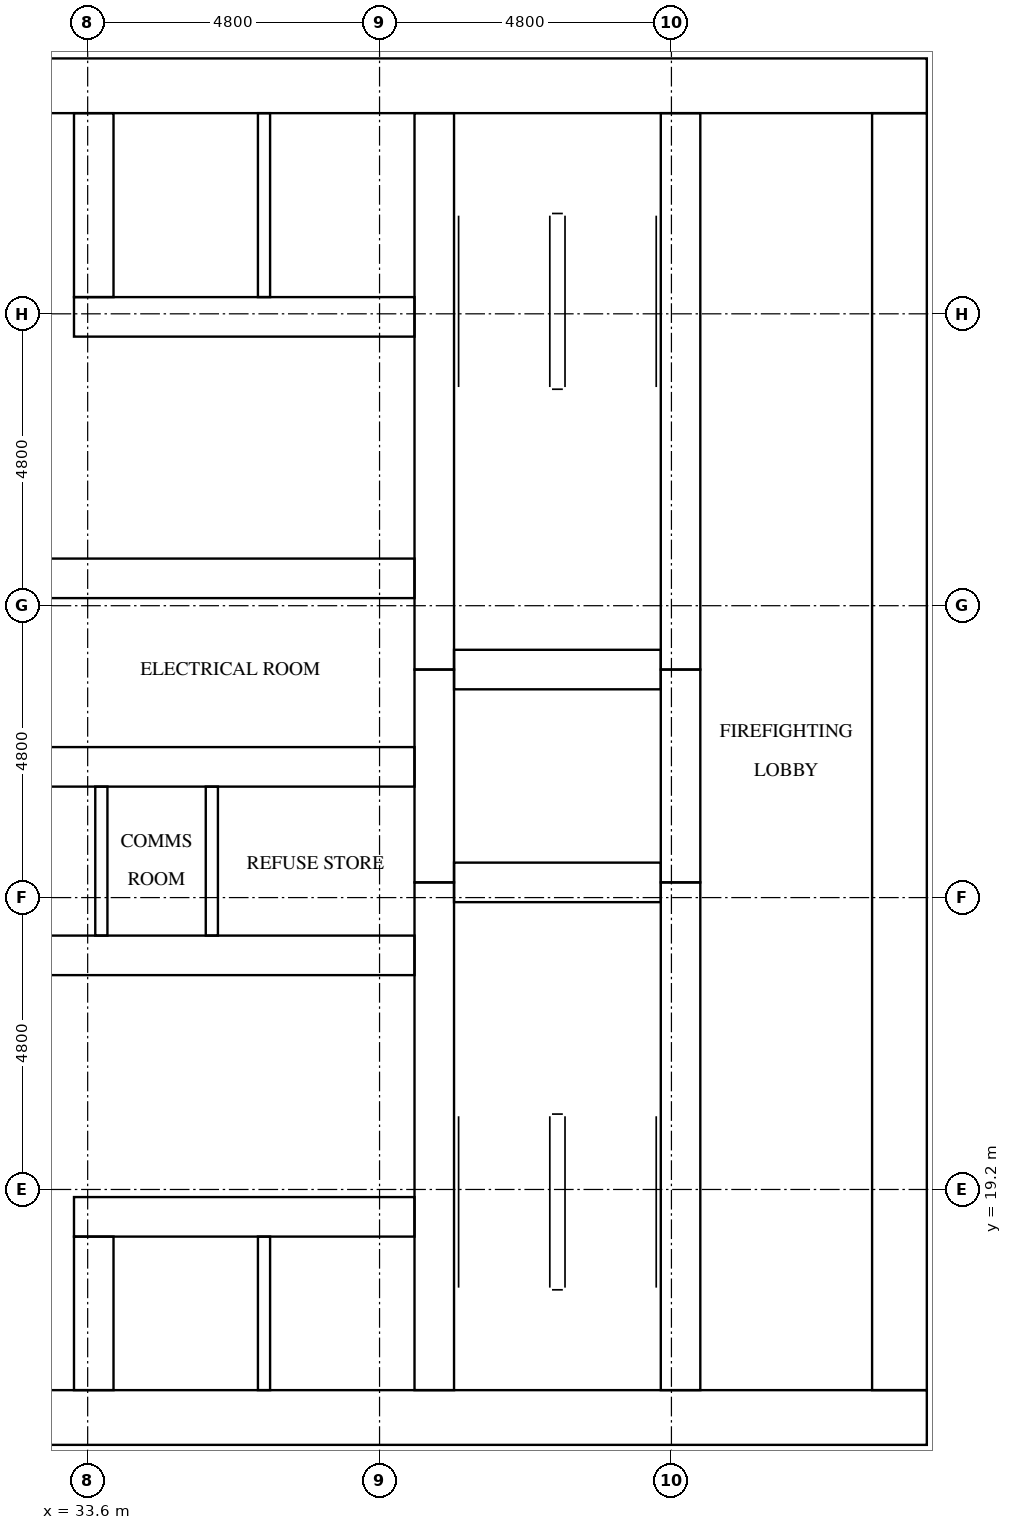
"""IFC4 building model, lengths in metres.
Left out: names, types, materials, properties, quantities, classifications, styles, units other than length and angle.
Written with IfcOpenShell. Run it as: python <this file> out.ifc"""

import sys

from ifc_helpers import new_model, si_unit, direction, frame, frame_2d, origin, place, context, subcontext, project, spatial, rectangle, extrude, element, fill, save


model = new_model("IFC4")
c1 = context("Model", 3, precision=1e-05, world=origin(), true_north=direction((0.0, 1.0)))
c2 = subcontext(c1, "Body", "Model", "MODEL_VIEW")
j1 = project(units=[si_unit("LENGTHUNIT", "METRE"), si_unit("PLANEANGLEUNIT", "RADIAN")], contexts=[c1])
p1 = place(None, origin())
s1 = spatial("IfcSite", under=j1, at=p1, CompositionType="ELEMENT")
p2 = place(p1, origin())
s2 = spatial("IfcBuilding", under=s1, at=p2, CompositionType="ELEMENT")
p3 = place(p2, frame((0.0, 0.0, 66.3)))
s3 = spatial("IfcBuildingStorey", under=s2, at=p3, CompositionType="ELEMENT", Elevation=66.3)
p4 = place(p3, frame((15.0, 15.45, 0.0), z_axis=(0.0, 0.0, 1.0), x_axis=(1.0, 0.0, 0.0)))
e1 = element("IfcWall", 1, at=p4, inside=s3, PredefinedType="SHEAR", context=c2, shape_type="SweptSolid", body=[
    extrude(rectangle(XDim=32.4, YDim=0.9, at=frame_2d((16.2, 0.0))), origin(), (0.0, 0.0, 1.0), 3.2),
])
p5 = place(p4, frame((15.3, 0.0, 0.0)))
e2 = element("IfcOpeningElement", 2, at=p5, cuts=e1, PredefinedType="OPENING", context=c2, shape_type="SweptSolid", body=[
    extrude(rectangle(XDim=1.8, YDim=2.1, at=frame_2d((0.9, 1.05))), frame((0.0, 0.46, 0.0), z_axis=(0.0, -1.0, 0.0), x_axis=(1.0, 0.0, 0.0)), (0.0, 0.0, 1.0), 0.92),
])
p6 = place(p3, frame((15.0, 37.35, 0.0), z_axis=(0.0, 0.0, 1.0), x_axis=(1.0, 0.0, 0.0)))
e3 = element("IfcWall", 3, at=p6, inside=s3, PredefinedType="SHEAR", context=c2, shape_type="SweptSolid", body=[
    extrude(rectangle(XDim=32.4, YDim=0.9, at=frame_2d((16.2, 0.0))), origin(), (0.0, 0.0, 1.0), 3.2),
])
p7 = place(p6, frame((15.3, 0.0, 0.0)))
e4 = element("IfcOpeningElement", 4, at=p7, cuts=e3, PredefinedType="OPENING", context=c2, shape_type="SweptSolid", body=[
    extrude(rectangle(XDim=1.8, YDim=2.1, at=frame_2d((0.9, 1.05))), frame((0.0, 0.46, 0.0), z_axis=(0.0, -1.0, 0.0), x_axis=(1.0, 0.0, 0.0)), (0.0, 0.0, 1.0), 0.92),
])
p8 = place(p6, frame((1.794, 0.0, 0.0)))
e5 = element("IfcOpeningElement", 5, at=p8, cuts=e3, PredefinedType="OPENING", context=c2, shape_type="SweptSolid", body=[
    extrude(rectangle(XDim=1.0, YDim=2.1, at=frame_2d((0.5, 1.05))), frame((0.0, 0.46, 0.0), z_axis=(0.0, -1.0, 0.0), x_axis=(1.0, 0.0, 0.0)), (0.0, 0.0, 1.0), 0.92),
])
p9 = place(p6, frame((5.331, 0.0, 0.0)))
e6 = element("IfcOpeningElement", 6, at=p9, cuts=e3, PredefinedType="OPENING", context=c2, shape_type="SweptSolid", body=[
    extrude(rectangle(XDim=1.0, YDim=2.1, at=frame_2d((0.5, 1.05))), frame((0.0, 0.46, 0.0), z_axis=(0.0, -1.0, 0.0), x_axis=(1.0, 0.0, 0.0)), (0.0, 0.0, 1.0), 0.92),
])
p10 = place(p3, frame((46.95, 15.9, 0.0), z_axis=(0.0, 0.0, 1.0), x_axis=(0.0, 1.0, 0.0)))
e7 = element("IfcWall", 7, at=p10, inside=s3, PredefinedType="SHEAR", context=c2, shape_type="SweptSolid", body=[
    extrude(rectangle(XDim=21.0, YDim=0.9, at=frame_2d((10.5, 0.0))), origin(), (0.0, 0.0, 1.0), 3.2),
])
p11 = place(p10, frame((10.2, 0.0, 0.0)))
e8 = element("IfcOpeningElement", 8, at=p11, cuts=e7, PredefinedType="OPENING", context=c2, shape_type="SweptSolid", body=[
    extrude(rectangle(XDim=1.2, YDim=2.1, at=frame_2d((0.6, 1.05))), frame((0.0, 0.46, 0.0), z_axis=(0.0, -1.0, 0.0), x_axis=(1.0, 0.0, 0.0)), (0.0, 0.0, 1.0), 0.92),
])
p12 = place(p3, frame((39.3, 15.9, 0.0), z_axis=(0.0, 0.0, 1.0), x_axis=(0.0, 1.0, 0.0)))
e9 = element("IfcWall", 9, at=p12, inside=s3, PredefinedType="SHEAR", context=c2, shape_type="SweptSolid", body=[
    extrude(rectangle(XDim=8.35, YDim=0.65, at=frame_2d((4.175, 0.0))), origin(), (0.0, 0.0, 1.0), 3.2),
])
p13 = place(p3, frame((39.3, 24.25, 0.0), z_axis=(0.0, 0.0, 1.0), x_axis=(0.0, 1.0, 0.0)))
e10 = element("IfcWall", 10, at=p13, inside=s3, PredefinedType="SHEAR", context=c2, shape_type="SweptSolid", body=[
    extrude(rectangle(XDim=3.5, YDim=0.65, at=frame_2d((1.75, 0.0))), origin(), (0.0, 0.0, 1.0), 3.2),
])
p14 = place(p3, frame((39.3, 27.75, 0.0), z_axis=(0.0, 0.0, 1.0), x_axis=(0.0, 1.0, 0.0)))
e11 = element("IfcWall", 11, at=p14, inside=s3, PredefinedType="SHEAR", context=c2, shape_type="SweptSolid", body=[
    extrude(rectangle(XDim=9.15, YDim=0.65, at=frame_2d((4.575, 0.0))), origin(), (0.0, 0.0, 1.0), 3.2),
])
p15 = place(p3, frame((43.35, 15.9, 0.0), z_axis=(0.0, 0.0, 1.0), x_axis=(0.0, 1.0, 0.0)))
e12 = element("IfcWall", 12, at=p15, inside=s3, PredefinedType="SHEAR", context=c2, shape_type="SweptSolid", body=[
    extrude(rectangle(XDim=8.35, YDim=0.65, at=frame_2d((4.175, 0.0))), origin(), (0.0, 0.0, 1.0), 3.2),
])
p16 = place(p15, frame((0.3, 0.0, 0.0)))
e13 = element("IfcOpeningElement", 13, at=p16, cuts=e12, PredefinedType="OPENING", context=c2, shape_type="SweptSolid", body=[
    extrude(rectangle(XDim=1.2, YDim=2.1, at=frame_2d((0.6, 1.05))), frame((0.0, 0.335, 0.0), z_axis=(0.0, -1.0, 0.0), x_axis=(1.0, 0.0, 0.0)), (0.0, 0.0, 1.0), 0.67),
])
p17 = place(p3, frame((43.35, 24.25, 0.0), z_axis=(0.0, 0.0, 1.0), x_axis=(0.0, 1.0, 0.0)))
e14 = element("IfcWall", 14, at=p17, inside=s3, PredefinedType="SHEAR", context=c2, shape_type="SweptSolid", body=[
    extrude(rectangle(XDim=3.5, YDim=0.65, at=frame_2d((1.75, 0.0))), origin(), (0.0, 0.0, 1.0), 3.2),
])
p18 = place(p17, frame((1.2, 0.0, 0.0)))
e15 = element("IfcOpeningElement", 15, at=p18, cuts=e14, PredefinedType="OPENING", context=c2, shape_type="SweptSolid", body=[
    extrude(rectangle(XDim=1.1, YDim=2.1, at=frame_2d((0.55, 1.05))), frame((0.0, 0.335, 0.0), z_axis=(0.0, -1.0, 0.0), x_axis=(1.0, 0.0, 0.0)), (0.0, 0.0, 1.0), 0.67),
])
p19 = place(p3, frame((43.35, 27.75, 0.0), z_axis=(0.0, 0.0, 1.0), x_axis=(0.0, 1.0, 0.0)))
e16 = element("IfcWall", 16, at=p19, inside=s3, PredefinedType="SHEAR", context=c2, shape_type="SweptSolid", body=[
    extrude(rectangle(XDim=9.15, YDim=0.65, at=frame_2d((4.575, 0.0))), origin(), (0.0, 0.0, 1.0), 3.2),
])
p20 = place(p19, frame((7.65, 0.0, 0.0)))
e17 = element("IfcOpeningElement", 17, at=p20, cuts=e16, PredefinedType="OPENING", context=c2, shape_type="SweptSolid", body=[
    extrude(rectangle(XDim=1.2, YDim=2.1, at=frame_2d((0.6, 1.05))), frame((0.0, 0.335, 0.0), z_axis=(0.0, -1.0, 0.0), x_axis=(1.0, 0.0, 0.0)), (0.0, 0.0, 1.0), 0.67),
])
for number, where, z_axis, x_axis in (
    (18, (39.625, 24.25, 0.0), (0.0, 0.0, 1.0), (1.0, 0.0, 0.0)),
    (19, (39.625, 27.75, 0.0), (0.0, 0.0, 1.0), (1.0, 0.0, 0.0)),
):
    element("IfcWall", number, at=place(p3, frame(where, z_axis=z_axis, x_axis=x_axis)), inside=s3, PredefinedType="SHEAR", context=c2, shape_type="SweptSolid", body=[
        extrude(rectangle(XDim=3.4, YDim=0.65, at=frame_2d((1.7, 0.0))), origin(), (0.0, 0.0, 1.0), 3.2),
    ])
p21 = place(p3, frame((33.375, 18.75, 0.0), z_axis=(0.0, 0.0, 1.0), x_axis=(1.0, 0.0, 0.0)))
e20 = element("IfcWall", 20, at=p21, inside=s3, PredefinedType="SHEAR", context=c2, shape_type="SweptSolid", body=[
    extrude(rectangle(XDim=5.6, YDim=0.65, at=frame_2d((2.8, 0.0))), origin(), (0.0, 0.0, 1.0), 3.2),
])
p22 = place(p21, frame((1.288, 0.0, 0.0)))
e21 = element("IfcOpeningElement", 21, at=p22, cuts=e20, PredefinedType="OPENING", context=c2, shape_type="SweptSolid", body=[
    extrude(rectangle(XDim=1.1, YDim=2.1, at=frame_2d((0.55, 1.05))), frame((0.0, 0.335, 0.0), z_axis=(0.0, -1.0, 0.0), x_axis=(1.0, 0.0, 0.0)), (0.0, 0.0, 1.0), 0.67),
])
p23 = place(p21, frame((3.863, 0.0, 0.0)))
e22 = element("IfcOpeningElement", 22, at=p23, cuts=e20, PredefinedType="OPENING", context=c2, shape_type="SweptSolid", body=[
    extrude(rectangle(XDim=1.1, YDim=2.1, at=frame_2d((0.55, 1.05))), frame((0.0, 0.335, 0.0), z_axis=(0.0, -1.0, 0.0), x_axis=(1.0, 0.0, 0.0)), (0.0, 0.0, 1.0), 0.67),
])
p24 = place(p3, frame((23.425, 23.05, 0.0), z_axis=(0.0, 0.0, 1.0), x_axis=(1.0, 0.0, 0.0)))
e23 = element("IfcWall", 23, at=p24, inside=s3, PredefinedType="SHEAR", context=c2, shape_type="SweptSolid", body=[
    extrude(rectangle(XDim=15.55, YDim=0.65, at=frame_2d((7.775, 0.0))), origin(), (0.0, 0.0, 1.0), 3.2),
])
p25 = place(p24, frame((0.663, 0.0, 0.0)))
e24 = element("IfcOpeningElement", 24, at=p25, cuts=e23, PredefinedType="OPENING", context=c2, shape_type="SweptSolid", body=[
    extrude(rectangle(XDim=1.1, YDim=2.1, at=frame_2d((0.55, 1.05))), frame((0.0, 0.335, 0.0), z_axis=(0.0, -1.0, 0.0), x_axis=(1.0, 0.0, 0.0)), (0.0, 0.0, 1.0), 0.67),
])
p26 = place(p24, frame((3.288, 0.0, 0.0)))
e25 = element("IfcOpeningElement", 25, at=p26, cuts=e23, PredefinedType="OPENING", context=c2, shape_type="SweptSolid", body=[
    extrude(rectangle(XDim=1.1, YDim=2.1, at=frame_2d((0.55, 1.05))), frame((0.0, 0.335, 0.0), z_axis=(0.0, -1.0, 0.0), x_axis=(1.0, 0.0, 0.0)), (0.0, 0.0, 1.0), 0.67),
])
p27 = place(p24, frame((10.809, 0.0, 0.0)))
e26 = element("IfcOpeningElement", 26, at=p27, cuts=e23, PredefinedType="OPENING", context=c2, shape_type="SweptSolid", body=[
    extrude(rectangle(XDim=1.0, YDim=2.1, at=frame_2d((0.5, 1.05))), frame((0.0, 0.335, 0.0), z_axis=(0.0, -1.0, 0.0), x_axis=(1.0, 0.0, 0.0)), (0.0, 0.0, 1.0), 0.67),
])
p28 = place(p24, frame((13.434, 0.0, 0.0)))
e27 = element("IfcOpeningElement", 27, at=p28, cuts=e23, PredefinedType="OPENING", context=c2, shape_type="SweptSolid", body=[
    extrude(rectangle(XDim=1.0, YDim=2.1, at=frame_2d((0.5, 1.05))), frame((0.0, 0.335, 0.0), z_axis=(0.0, -1.0, 0.0), x_axis=(1.0, 0.0, 0.0)), (0.0, 0.0, 1.0), 0.67),
])
p29 = place(p3, frame((23.425, 26.15, 0.0), z_axis=(0.0, 0.0, 1.0), x_axis=(1.0, 0.0, 0.0)))
e28 = element("IfcWall", 28, at=p29, inside=s3, PredefinedType="SHEAR", context=c2, shape_type="SweptSolid", body=[
    extrude(rectangle(XDim=15.55, YDim=0.65, at=frame_2d((7.775, 0.0))), origin(), (0.0, 0.0, 1.0), 3.2),
])
p30 = place(p3, frame((23.425, 29.25, 0.0), z_axis=(0.0, 0.0, 1.0), x_axis=(1.0, 0.0, 0.0)))
e29 = element("IfcWall", 29, at=p30, inside=s3, PredefinedType="SHEAR", context=c2, shape_type="SweptSolid", body=[
    extrude(rectangle(XDim=15.55, YDim=0.65, at=frame_2d((7.775, 0.0))), origin(), (0.0, 0.0, 1.0), 3.2),
])
p31 = place(p30, frame((2.508, 0.0, 0.0)))
e30 = element("IfcOpeningElement", 30, at=p31, cuts=e29, PredefinedType="OPENING", context=c2, shape_type="SweptSolid", body=[
    extrude(rectangle(XDim=1.0, YDim=2.1, at=frame_2d((0.5, 1.05))), frame((0.0, 0.335, 0.0), z_axis=(0.0, -1.0, 0.0), x_axis=(1.0, 0.0, 0.0)), (0.0, 0.0, 1.0), 0.67),
])
p32 = place(p30, frame((7.275, 0.0, 0.0)))
e31 = element("IfcOpeningElement", 31, at=p32, cuts=e29, PredefinedType="OPENING", context=c2, shape_type="SweptSolid", body=[
    extrude(rectangle(XDim=1.0, YDim=2.1, at=frame_2d((0.5, 1.05))), frame((0.0, 0.335, 0.0), z_axis=(0.0, -1.0, 0.0), x_axis=(1.0, 0.0, 0.0)), (0.0, 0.0, 1.0), 0.67),
])
p33 = place(p30, frame((12.042, 0.0, 0.0)))
e32 = element("IfcOpeningElement", 32, at=p33, cuts=e29, PredefinedType="OPENING", context=c2, shape_type="SweptSolid", body=[
    extrude(rectangle(XDim=1.0, YDim=2.1, at=frame_2d((0.5, 1.05))), frame((0.0, 0.335, 0.0), z_axis=(0.0, -1.0, 0.0), x_axis=(1.0, 0.0, 0.0)), (0.0, 0.0, 1.0), 0.67),
])
p34 = place(p3, frame((33.375, 33.55, 0.0), z_axis=(0.0, 0.0, 1.0), x_axis=(1.0, 0.0, 0.0)))
e33 = element("IfcWall", 33, at=p34, inside=s3, PredefinedType="SHEAR", context=c2, shape_type="SweptSolid", body=[
    extrude(rectangle(XDim=5.6, YDim=0.65, at=frame_2d((2.8, 0.0))), origin(), (0.0, 0.0, 1.0), 3.2),
])
p35 = place(p3, frame((33.7, 15.9, 0.0), z_axis=(0.0, 0.0, 1.0), x_axis=(0.0, 1.0, 0.0)))
e34 = element("IfcWall", 34, at=p35, inside=s3, PredefinedType="SHEAR", context=c2, shape_type="SweptSolid", body=[
    extrude(rectangle(XDim=2.525, YDim=0.65, at=frame_2d((1.263, 0.0))), origin(), (0.0, 0.0, 1.0), 3.2),
])
p36 = place(p3, frame((33.7, 33.875, 0.0), z_axis=(0.0, 0.0, 1.0), x_axis=(0.0, 1.0, 0.0)))
e35 = element("IfcWall", 35, at=p36, inside=s3, PredefinedType="SHEAR", context=c2, shape_type="SweptSolid", body=[
    extrude(rectangle(XDim=3.025, YDim=0.65, at=frame_2d((1.512, 0.0))), origin(), (0.0, 0.0, 1.0), 3.2),
])
p37 = place(p3, frame((33.825, 23.375, 0.0), z_axis=(0.0, 0.0, 1.0), x_axis=(0.0, 1.0, 0.0)))
e36 = element("IfcWall", 36, at=p37, inside=s3, PredefinedType="SOLIDWALL", context=c2, shape_type="SweptSolid", body=[
    extrude(rectangle(XDim=2.45, YDim=0.2, at=frame_2d((1.225, 0.0))), origin(), (0.0, 0.0, 1.0), 3.2),
])
p38 = place(p3, frame((36.5, 15.9, 0.0), z_axis=(0.0, 0.0, 1.0), x_axis=(0.0, 1.0, 0.0)))
e37 = element("IfcWall", 37, at=p38, inside=s3, PredefinedType="SOLIDWALL", context=c2, shape_type="SweptSolid", body=[
    extrude(rectangle(XDim=2.525, YDim=0.2, at=frame_2d((1.263, 0.0))), origin(), (0.0, 0.0, 1.0), 3.2),
])
p39 = place(p3, frame((36.5, 33.875, 0.0), z_axis=(0.0, 0.0, 1.0), x_axis=(0.0, 1.0, 0.0)))
e38 = element("IfcWall", 38, at=p39, inside=s3, PredefinedType="SOLIDWALL", context=c2, shape_type="SweptSolid", body=[
    extrude(rectangle(XDim=3.025, YDim=0.2, at=frame_2d((1.512, 0.0))), origin(), (0.0, 0.0, 1.0), 3.2),
])
p40 = place(p3, frame((35.642, 23.375, 0.0), z_axis=(0.0, 0.0, 1.0), x_axis=(0.0, 1.0, 0.0)))
e39 = element("IfcWall", 39, at=p40, inside=s3, PredefinedType="PARTITIONING", context=c2, shape_type="SweptSolid", body=[
    extrude(rectangle(XDim=2.45, YDim=0.2, at=frame_2d((1.225, 0.0))), origin(), (0.0, 0.0, 1.0), 3.2),
])
p41 = place(p22, origin())
e40 = element("IfcDoor", 40, at=p41, inside=s3, OperationType="DOUBLE_DOOR_SLIDING", PredefinedType="DOOR", context=c2, shape_type="SweptSolid", body=[
    extrude(rectangle(XDim=1.1, YDim=2.1, at=frame_2d((0.55, 1.05))), frame((0.0, 0.025, 0.0), z_axis=(0.0, -1.0, 0.0), x_axis=(1.0, 0.0, 0.0)), (0.0, 0.0, 1.0), 0.05),
])
fill(e21, e40)
p42 = place(p23, origin())
e41 = element("IfcDoor", 41, at=p42, inside=s3, OperationType="DOUBLE_DOOR_SLIDING", PredefinedType="DOOR", context=c2, shape_type="SweptSolid", body=[
    extrude(rectangle(XDim=1.1, YDim=2.1, at=frame_2d((0.55, 1.05))), frame((0.0, 0.025, 0.0), z_axis=(0.0, -1.0, 0.0), x_axis=(1.0, 0.0, 0.0)), (0.0, 0.0, 1.0), 0.05),
])
fill(e22, e41)
p43 = place(p18, origin())
e42 = element("IfcDoor", 42, at=p43, inside=s3, OperationType="DOUBLE_DOOR_SLIDING", PredefinedType="DOOR", context=c2, shape_type="SweptSolid", body=[
    extrude(rectangle(XDim=1.1, YDim=2.1, at=frame_2d((0.55, 1.05))), frame((0.0, 0.025, 0.0), z_axis=(0.0, -1.0, 0.0), x_axis=(1.0, 0.0, 0.0)), (0.0, 0.0, 1.0), 0.05),
])
fill(e15, e42)
p44 = place(p16, origin())
e43 = element("IfcDoor", 43, at=p44, inside=s3, OperationType="SINGLE_SWING_LEFT", PredefinedType="DOOR", context=c2, shape_type="SweptSolid", body=[
    extrude(rectangle(XDim=1.2, YDim=2.1, at=frame_2d((0.6, 1.05))), frame((0.0, 0.025, 0.0), z_axis=(0.0, -1.0, 0.0), x_axis=(1.0, 0.0, 0.0)), (0.0, 0.0, 1.0), 0.05),
])
fill(e13, e43)
p45 = place(p20, origin())
e44 = element("IfcDoor", 44, at=p45, inside=s3, OperationType="SINGLE_SWING_RIGHT", PredefinedType="DOOR", context=c2, shape_type="SweptSolid", body=[
    extrude(rectangle(XDim=1.2, YDim=2.1, at=frame_2d((0.6, 1.05))), frame((0.0, 0.025, 0.0), z_axis=(0.0, -1.0, 0.0), x_axis=(1.0, 0.0, 0.0)), (0.0, 0.0, 1.0), 0.05),
])
fill(e17, e44)
p46 = place(p11, origin())
e45 = element("IfcDoor", 45, at=p46, inside=s3, OperationType="SINGLE_SWING_RIGHT", PredefinedType="DOOR", context=c2, shape_type="SweptSolid", body=[
    extrude(rectangle(XDim=1.2, YDim=2.1, at=frame_2d((0.6, 1.05))), frame((0.0, 0.025, 0.0), z_axis=(0.0, -1.0, 0.0), x_axis=(1.0, 0.0, 0.0)), (0.0, 0.0, 1.0), 0.05),
])
fill(e8, e45)
p47 = place(p27, frame((1.0, 0.0, 0.0), z_axis=(0.0, 0.0, 1.0), x_axis=(-1.0, 0.0, 0.0)))
e46 = element("IfcDoor", 46, at=p47, inside=s3, OperationType="SINGLE_SWING_LEFT", PredefinedType="DOOR", context=c2, shape_type="SweptSolid", body=[
    extrude(rectangle(XDim=1.0, YDim=2.1, at=frame_2d((0.5, 1.05))), frame((0.0, 0.025, 0.0), z_axis=(0.0, -1.0, 0.0), x_axis=(1.0, 0.0, 0.0)), (0.0, 0.0, 1.0), 0.05),
])
fill(e26, e46)
p48 = place(p28, frame((1.0, 0.0, 0.0), z_axis=(0.0, 0.0, 1.0), x_axis=(-1.0, 0.0, 0.0)))
e47 = element("IfcDoor", 47, at=p48, inside=s3, OperationType="SINGLE_SWING_RIGHT", PredefinedType="DOOR", context=c2, shape_type="SweptSolid", body=[
    extrude(rectangle(XDim=1.0, YDim=2.1, at=frame_2d((0.5, 1.05))), frame((0.0, 0.025, 0.0), z_axis=(0.0, -1.0, 0.0), x_axis=(1.0, 0.0, 0.0)), (0.0, 0.0, 1.0), 0.05),
])
fill(e27, e47)
p49 = place(p33, origin())
e48 = element("IfcDoor", 48, at=p49, inside=s3, OperationType="SINGLE_SWING_LEFT", PredefinedType="DOOR", context=c2, shape_type="SweptSolid", body=[
    extrude(rectangle(XDim=1.0, YDim=2.1, at=frame_2d((0.5, 1.05))), frame((0.0, 0.025, 0.0), z_axis=(0.0, -1.0, 0.0), x_axis=(1.0, 0.0, 0.0)), (0.0, 0.0, 1.0), 0.05),
])
fill(e32, e48)
save(model, sys.argv[1])
